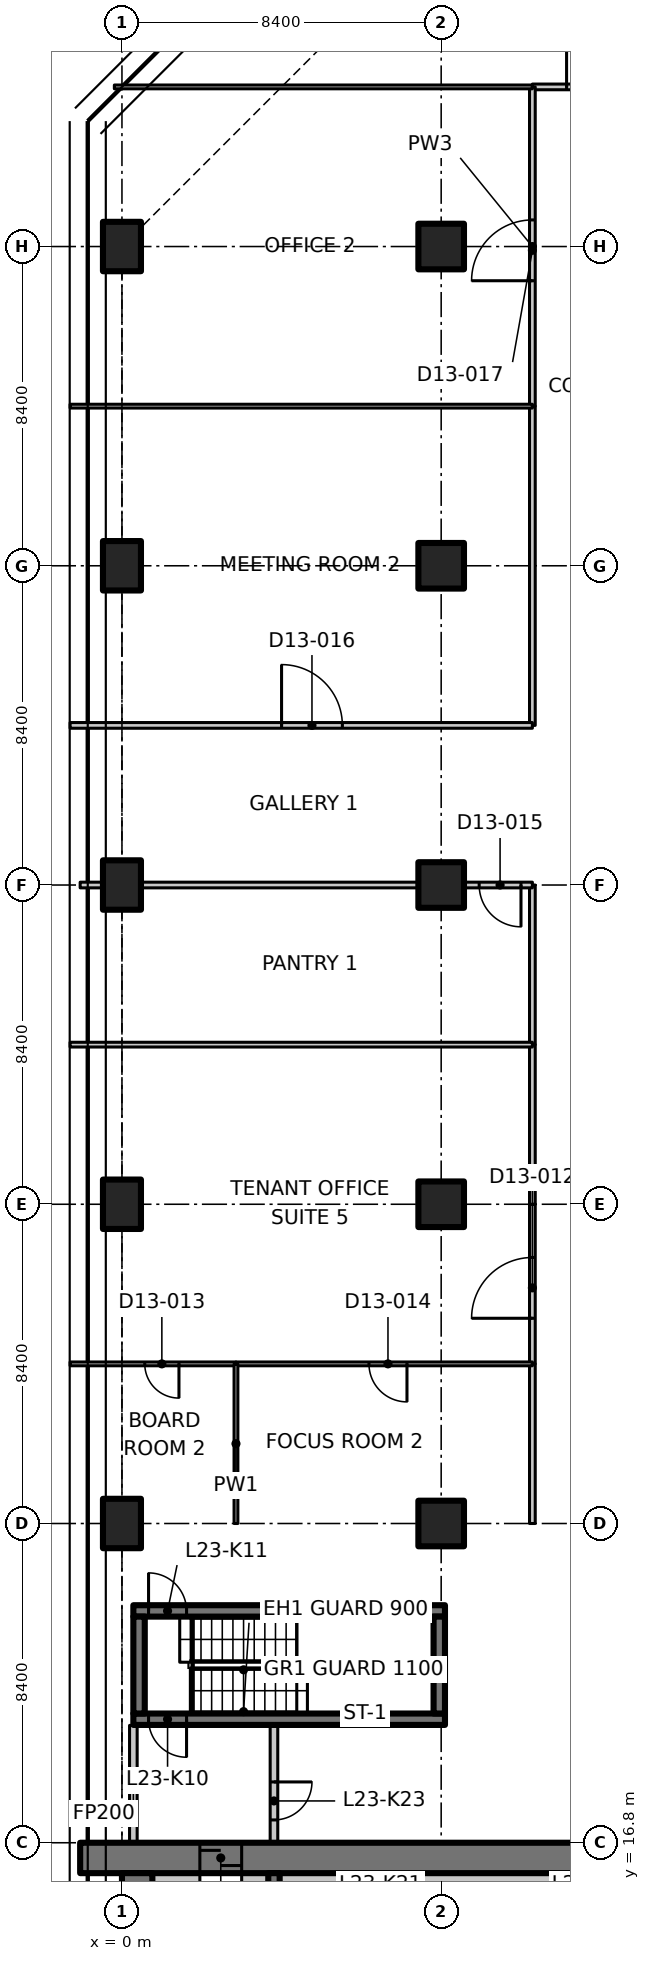
"""IFC4 building model, lengths in metres.
Left out: names, types, materials, properties, quantities, classifications, styles, units other than length and angle.
Written with IfcOpenShell. Run it as: python <this file> out.ifc"""

import sys

from ifc_helpers import new_model, si_unit, direction, frame, frame_2d, origin, origin_2d, place, context, subcontext, project, spatial, polyline, rectangle, outline, extrude, element, fill, save


model = new_model("IFC4")
c1 = context("Model", 3, precision=1e-05, world=origin(), true_north=direction((0.0, 1.0)))
c2 = subcontext(c1, "Body", "Model", "MODEL_VIEW")
j1 = project(units=[si_unit("LENGTHUNIT", "METRE"), si_unit("PLANEANGLEUNIT", "RADIAN")], contexts=[c1])
p1 = place(None, origin())
s1 = spatial("IfcSite", under=j1, at=p1, CompositionType="ELEMENT")
p2 = place(p1, origin())
s2 = spatial("IfcBuilding", under=s1, at=p2, CompositionType="ELEMENT")
p3 = place(p2, frame((0.0, 0.0, 98.9)))
s3 = spatial("IfcBuildingStorey", under=s2, at=p3, CompositionType="ELEMENT", Elevation=98.9)
for number, where, z_axis, x_axis in (
    (1, (0.0, 25.2, 0.0), (0.0, 0.0, 1.0), (1.0, 0.0, 0.0)),
    (2, (0.0, 33.6, 0.0), (0.0, 0.0, 1.0), (1.0, 0.0, 0.0)),
    (3, (0.0, 42.0, 0.0), (0.0, 0.0, 1.0), (1.0, 0.0, 0.0)),
    (4, (0.0, 50.4, 0.0), (0.0, 0.0, 1.0), (1.0, 0.0, 0.0)),
    (5, (0.0, 58.8, 0.0), (0.0, 0.0, 1.0), (1.0, 0.0, 0.0)),
):
    element("IfcColumn", number, at=place(p3, frame(where, z_axis=z_axis, x_axis=x_axis)), inside=s3, PredefinedType="COLUMN", context=c2, shape_type="SweptSolid", body=[
        extrude(rectangle(XDim=1.0, YDim=1.3, at=origin_2d()), origin(), (0.0, 0.0, 1.0), 3.35),
    ])
for number, where, z_axis, x_axis in (
    (6, (8.4, 25.2, 0.0), (0.0, 0.0, 1.0), (1.0, 0.0, 0.0)),
    (7, (8.4, 33.6, 0.0), (0.0, 0.0, 1.0), (1.0, 0.0, 0.0)),
    (8, (8.4, 42.0, 0.0), (0.0, 0.0, 1.0), (1.0, 0.0, 0.0)),
    (9, (8.4, 50.4, 0.0), (0.0, 0.0, 1.0), (1.0, 0.0, 0.0)),
    (10, (8.4, 58.8, 0.0), (0.0, 0.0, 1.0), (1.0, 0.0, 0.0)),
):
    element("IfcColumn", number, at=place(p3, frame(where, z_axis=z_axis, x_axis=x_axis)), inside=s3, PredefinedType="COLUMN", context=c2, shape_type="SweptSolid", body=[
        extrude(rectangle(XDim=1.2, YDim=1.2, at=origin_2d()), origin(), (0.0, 0.0, 1.0), 3.35),
    ])
p4 = place(p3, frame((-1.1, 16.4, 0.0), z_axis=(0.0, 0.0, 1.0), x_axis=(1.0, 0.0, 0.0)))
e11 = element("IfcWall", 11, at=p4, inside=s3, PredefinedType="SHEAR", context=c2, shape_type="SweptSolid", body=[
    extrude(rectangle(XDim=22.1, YDim=0.8, at=frame_2d((11.05, 0.0))), origin(), (0.0, 0.0, 1.0), 3.35),
])
p5 = place(p4, frame((3.15, 0.0, 0.0)))
e12 = element("IfcOpeningElement", 12, at=p5, cuts=e11, PredefinedType="OPENING", context=c2, shape_type="SweptSolid", body=[
    extrude(rectangle(XDim=1.1, YDim=2.3, at=frame_2d((0.55, 1.15))), frame((0.0, 0.41, 0.0), z_axis=(0.0, -1.0, 0.0), x_axis=(1.0, 0.0, 0.0)), (0.0, 0.0, 1.0), 0.82),
])
p6 = place(p3, frame((0.4, 7.136, 0.0), z_axis=(0.0, 0.0, 1.0), x_axis=(0.0, 1.0, 0.0)))
e13 = element("IfcWall", 13, at=p6, inside=s3, PredefinedType="SHEAR", context=c2, shape_type="SweptSolid", body=[
    extrude(rectangle(XDim=8.864, YDim=0.8, at=frame_2d((4.432, 0.0))), origin(), (0.0, 0.0, 1.0), 3.35),
])
p7 = place(p3, frame((0.8, 15.8, 0.0), z_axis=(0.0, 0.0, 1.0), x_axis=(1.0, 0.0, 0.0)))
e14 = element("IfcWall", 14, at=p7, inside=s3, PredefinedType="PARTITIONING", context=c2, shape_type="SweptSolid", body=[
    extrude(rectangle(XDim=1.25, YDim=0.4, at=frame_2d((0.625, 0.0))), origin(), (0.0, 0.0, 1.0), 3.35),
])
p8 = place(p3, frame((4.0, 12.95, 0.0), z_axis=(0.0, 0.0, 1.0), x_axis=(0.0, 1.0, 0.0)))
e15 = element("IfcWall", 15, at=p8, inside=s3, PredefinedType="SHEAR", context=c2, shape_type="SweptSolid", body=[
    extrude(rectangle(XDim=3.05, YDim=0.3, at=frame_2d((1.525, 0.0))), origin(), (0.0, 0.0, 1.0), 3.35),
])
p9 = place(p3, frame((8.5, 20.05, 0.0), z_axis=(0.0, 0.0, 1.0), x_axis=(-1.0, 0.0, 0.0)))
e16 = element("IfcWall", 16, at=p9, inside=s3, PredefinedType="SHEAR", context=c2, shape_type="SweptSolid", body=[
    extrude(rectangle(XDim=8.2, YDim=0.3, at=frame_2d((4.1, 0.0))), origin(), (0.0, 0.0, 1.0), 3.35),
])
p10 = place(p9, frame((6.8, 0.0, 0.0)))
e17 = element("IfcOpeningElement", 17, at=p10, cuts=e16, PredefinedType="OPENING", context=c2, shape_type="SweptSolid", body=[
    extrude(rectangle(XDim=1.0, YDim=2.1, at=frame_2d((0.5, 1.05))), frame((0.0, 0.16, 0.0), z_axis=(0.0, -1.0, 0.0), x_axis=(1.0, 0.0, 0.0)), (0.0, 0.0, 1.0), 0.32),
])
p11 = place(p3, frame((0.3, 22.9, 0.0), z_axis=(0.0, 0.0, 1.0), x_axis=(1.0, 0.0, 0.0)))
e18 = element("IfcWall", 18, at=p11, inside=s3, PredefinedType="SHEAR", context=c2, shape_type="SweptSolid", body=[
    extrude(rectangle(XDim=8.2, YDim=0.3, at=frame_2d((4.1, 0.0))), origin(), (0.0, 0.0, 1.0), 3.35),
])
p12 = place(p11, frame((0.4, 0.0, 0.0)))
e19 = element("IfcOpeningElement", 19, at=p12, cuts=e18, PredefinedType="OPENING", context=c2, shape_type="SweptSolid", body=[
    extrude(rectangle(XDim=1.0, YDim=2.1, at=frame_2d((0.5, 1.05))), frame((0.0, 0.16, 0.0), z_axis=(0.0, -1.0, 0.0), x_axis=(1.0, 0.0, 0.0)), (0.0, 0.0, 1.0), 0.32),
])
for number, where, z_axis, x_axis in (
    (20, (0.45, 20.2, 0.0), (0.0, 0.0, 1.0), (0.0, 1.0, 0.0)),
    (21, (8.35, 20.2, 0.0), (0.0, 0.0, 1.0), (0.0, 1.0, 0.0)),
):
    element("IfcWall", number, at=place(p3, frame(where, z_axis=z_axis, x_axis=x_axis)), inside=s3, PredefinedType="SHEAR", context=c2, shape_type="SweptSolid", body=[
        extrude(rectangle(XDim=2.55, YDim=0.3, at=frame_2d((1.275, 0.0))), origin(), (0.0, 0.0, 1.0), 3.35),
    ])
p13 = place(p3, frame((0.3, 16.812, 0.0), z_axis=(0.0, 0.0, 1.0), x_axis=(0.0, 1.0, 0.0)))
e22 = element("IfcWall", 22, at=p13, inside=s3, PredefinedType="PARTITIONING", context=c2, shape_type="SweptSolid", body=[
    extrude(rectangle(XDim=3.076, YDim=0.2, at=frame_2d((1.538, 0.0))), origin(), (0.0, 0.0, 1.0), 2.98),
])
p14 = place(p3, frame((4.0, 19.888, 0.0), z_axis=(0.0, 0.0, 1.0), x_axis=(0.0, -1.0, 0.0)))
e23 = element("IfcWall", 23, at=p14, inside=s3, PredefinedType="PARTITIONING", context=c2, shape_type="SweptSolid", body=[
    extrude(rectangle(XDim=3.076, YDim=0.2, at=frame_2d((1.538, 0.0))), origin(), (0.0, 0.0, 1.0), 3.35),
])
p15 = place(p14, frame((1.488, 0.0, 0.0)))
e24 = element("IfcOpeningElement", 24, at=p15, cuts=e23, PredefinedType="OPENING", context=c2, shape_type="SweptSolid", body=[
    extrude(rectangle(XDim=1.0, YDim=2.1, at=frame_2d((0.5, 1.05))), frame((0.0, 0.11, 0.0), z_axis=(0.0, -1.0, 0.0), x_axis=(1.0, 0.0, 0.0)), (0.0, 0.0, 1.0), 0.22),
])
p16 = place(p3, frame((3.15, 15.8, 0.0), z_axis=(0.0, 0.0, 1.0), x_axis=(1.0, 0.0, 0.0)))
e25 = element("IfcWall", 25, at=p16, inside=s3, PredefinedType="PARTITIONING", context=c2, shape_type="SweptSolid", body=[
    extrude(rectangle(XDim=0.7, YDim=0.4, at=frame_2d((0.35, 0.0))), origin(), (0.0, 0.0, 1.0), 3.35),
])
p17 = place(p3, frame((4.15, 15.8, 0.0), z_axis=(0.0, 0.0, 1.0), x_axis=(1.0, 0.0, 0.0)))
e26 = element("IfcWall", 26, at=p17, inside=s3, PredefinedType="PARTITIONING", context=c2, shape_type="SweptSolid", body=[
    extrude(rectangle(XDim=10.9, YDim=0.4, at=frame_2d((5.45, 0.0))), origin(), (0.0, 0.0, 1.0), 3.35),
])
p18 = place(p3, frame((10.8, 29.4, 0.0), z_axis=(0.0, 0.0, 1.0), x_axis=(0.0, 1.0, 0.0)))
e27 = element("IfcWall", 27, at=p18, inside=s3, PredefinedType="PARTITIONING", context=c2, shape_type="SweptSolid", body=[
    extrude(rectangle(XDim=4.2, YDim=0.15, at=frame_2d((2.1, 0.0))), origin(), (0.0, 0.0, 1.0), 3.33),
])
p19 = place(p18, frame((1.2, 0.0, 0.0)))
e28 = element("IfcOpeningElement", 28, at=p19, cuts=e27, PredefinedType="OPENING", context=c2, shape_type="SweptSolid", body=[
    extrude(rectangle(XDim=1.6, YDim=2.1, at=frame_2d((0.8, 1.05))), frame((0.0, 0.085, 0.0), z_axis=(0.0, -1.0, 0.0), x_axis=(1.0, 0.0, 0.0)), (0.0, 0.0, 1.0), 0.17),
])
p20 = place(p3, frame((10.8, 25.2, 0.0), z_axis=(0.0, 0.0, 1.0), x_axis=(0.0, 1.0, 0.0)))
e29 = element("IfcWall", 29, at=p20, inside=s3, PredefinedType="PARTITIONING", context=c2, shape_type="SweptSolid", body=[
    extrude(rectangle(XDim=4.2, YDim=0.15, at=frame_2d((2.1, 0.0))), origin(), (0.0, 0.0, 1.0), 3.33),
])
p21 = place(p3, frame((10.8, 63.0, 0.0), z_axis=(0.0, 0.0, 1.0), x_axis=(1.0, 0.0, 0.0)))
e30 = element("IfcWall", 30, at=p21, inside=s3, PredefinedType="PARTITIONING", context=c2, shape_type="SweptSolid", body=[
    extrude(rectangle(XDim=3.6, YDim=0.15, at=frame_2d((1.8, 0.0))), origin(), (0.0, 0.0, 1.0), 3.33),
])
p22 = place(p21, frame((0.9, 0.0, 0.0)))
e31 = element("IfcOpeningElement", 31, at=p22, cuts=e30, PredefinedType="OPENING", context=c2, shape_type="SweptSolid", body=[
    extrude(rectangle(XDim=2.0, YDim=2.4, at=frame_2d((1.0, 1.2))), frame((0.0, 0.085, 0.0), z_axis=(0.0, -1.0, 0.0), x_axis=(1.0, 0.0, 0.0)), (0.0, 0.0, 1.0), 0.17),
])
for number, where, z_axis, x_axis in (
    (32, (10.8, 33.6, 0.0), (0.0, 0.0, 1.0), (0.0, 1.0, 0.0)),
    (33, (10.8, 37.8, 0.0), (0.0, 0.0, 1.0), (0.0, 1.0, 0.0)),
):
    element("IfcWall", number, at=place(p3, frame(where, z_axis=z_axis, x_axis=x_axis)), inside=s3, PredefinedType="PARTITIONING", context=c2, shape_type="SweptSolid", body=[
        extrude(rectangle(XDim=4.2, YDim=0.15, at=frame_2d((2.1, 0.0))), origin(), (0.0, 0.0, 1.0), 3.33),
    ])
p23 = place(p3, frame((10.8, 46.2, 0.0), z_axis=(0.0, 0.0, 1.0), x_axis=(0.0, 1.0, 0.0)))
e34 = element("IfcWall", 34, at=p23, inside=s3, PredefinedType="PARTITIONING", context=c2, shape_type="SweptSolid", body=[
    extrude(rectangle(XDim=8.4, YDim=0.15, at=frame_2d((4.2, 0.0))), origin(), (0.0, 0.0, 1.0), 3.33),
])
p24 = place(p3, frame((10.8, 54.6, 0.0), z_axis=(0.0, 0.0, 1.0), x_axis=(0.0, 1.0, 0.0)))
e35 = element("IfcWall", 35, at=p24, inside=s3, PredefinedType="PARTITIONING", context=c2, shape_type="SweptSolid", body=[
    extrude(rectangle(XDim=8.4, YDim=0.15, at=frame_2d((4.2, 0.0))), origin(), (0.0, 0.0, 1.0), 3.33),
])
p25 = place(p24, frame((3.3, 0.0, 0.0)))
e36 = element("IfcOpeningElement", 36, at=p25, cuts=e35, PredefinedType="OPENING", context=c2, shape_type="SweptSolid", body=[
    extrude(rectangle(XDim=1.6, YDim=2.1, at=frame_2d((0.8, 1.05))), frame((0.0, 0.085, 0.0), z_axis=(0.0, -1.0, 0.0), x_axis=(1.0, 0.0, 0.0)), (0.0, 0.0, 1.0), 0.17),
])
p26 = place(p3, frame((10.8, 63.0, 0.0), z_axis=(0.0, 0.0, 1.0), x_axis=(-1.0, 0.0, 0.0)))
e37 = element("IfcWall", 37, at=p26, inside=s3, PredefinedType="PARTITIONING", context=c2, shape_type="SweptSolid", body=[
    extrude(outline(polyline([(0.0, 0.0), (11.0, 0.0), (11.0, 3.33), (7.266, 3.33), (7.264, 2.98), (5.936, 2.98), (5.934, 3.33), (0.0, 3.33), (0.0, 0.0)])), frame((0.0, 0.05, 0.0), z_axis=(0.0, -1.0, 0.0), x_axis=(1.0, 0.0, 0.0)), (0.0, 0.0, 1.0), 0.1),
])
p27 = place(p3, frame((10.8, 42.0, 0.0), z_axis=(0.0, 0.0, 1.0), x_axis=(-1.0, 0.0, 0.0)))
e38 = element("IfcWall", 38, at=p27, inside=s3, PredefinedType="PARTITIONING", context=c2, shape_type="SweptSolid", body=[
    extrude(rectangle(XDim=1.78, YDim=0.15, at=frame_2d((0.89, 0.0))), origin(), (0.0, 0.0, 1.0), 3.33),
])
p28 = place(p27, frame((0.3, 0.0, 0.0)))
e39 = element("IfcOpeningElement", 39, at=p28, cuts=e38, PredefinedType="OPENING", context=c2, shape_type="SweptSolid", body=[
    extrude(rectangle(XDim=1.1, YDim=2.1, at=frame_2d((0.55, 1.05))), frame((0.0, 0.085, 0.0), z_axis=(0.0, -1.0, 0.0), x_axis=(1.0, 0.0, 0.0)), (0.0, 0.0, 1.0), 0.17),
])
p29 = place(p3, frame((7.78, 42.0, 0.0), z_axis=(0.0, 0.0, 1.0), x_axis=(-1.0, 0.0, 0.0)))
e40 = element("IfcWall", 40, at=p29, inside=s3, PredefinedType="PARTITIONING", context=c2, shape_type="SweptSolid", body=[
    extrude(rectangle(XDim=7.26, YDim=0.15, at=frame_2d((3.63, 0.0))), origin(), (0.0, 0.0, 1.0), 3.33),
])
p30 = place(p3, frame((-0.52, 42.0, 0.0), z_axis=(0.0, 0.0, 1.0), x_axis=(-1.0, 0.0, 0.0)))
e41 = element("IfcWall", 41, at=p30, inside=s3, PredefinedType="PARTITIONING", context=c2, shape_type="SweptSolid", body=[
    extrude(rectangle(XDim=0.58, YDim=0.15, at=frame_2d((0.29, 0.0))), origin(), (0.0, 0.0, 1.0), 3.33),
])
p31 = place(p3, frame((-1.365, 46.2, 0.0), z_axis=(0.0, 0.0, 1.0), x_axis=(1.0, 0.0, 0.0)))
e42 = element("IfcWall", 42, at=p31, inside=s3, PredefinedType="PARTITIONING", context=c2, shape_type="SweptSolid", body=[
    extrude(outline(polyline([(0.0, 0.0), (12.165, 0.0), (12.165, 3.33), (1.815, 3.33), (1.813, 2.98), (0.917, 2.98), (0.915, 3.33), (0.265, 3.33), (0.0, 3.33), (0.0, 0.0)])), frame((0.0, 0.075, 0.0), z_axis=(0.0, -1.0, 0.0), x_axis=(1.0, 0.0, 0.0)), (0.0, 0.0, 1.0), 0.15),
])
p32 = place(p31, frame((5.565, 0.0, 0.0)))
e43 = element("IfcOpeningElement", 43, at=p32, cuts=e42, PredefinedType="OPENING", context=c2, shape_type="SweptSolid", body=[
    extrude(rectangle(XDim=1.6, YDim=2.1, at=frame_2d((0.8, 1.05))), frame((0.0, 0.085, 0.0), z_axis=(0.0, -1.0, 0.0), x_axis=(1.0, 0.0, 0.0)), (0.0, 0.0, 1.0), 0.17),
])
p33 = place(p3, frame((3.0, 29.4, 0.0), z_axis=(0.0, 0.0, 1.0), x_axis=(-1.0, 0.0, 0.0)))
e44 = element("IfcWall", 44, at=p33, inside=s3, PredefinedType="PARTITIONING", context=c2, shape_type="SweptSolid", body=[
    extrude(rectangle(XDim=4.365, YDim=0.1, at=frame_2d((2.183, 0.0))), origin(), (0.0, 0.0, 1.0), 2.98),
])
p34 = place(p33, frame((1.5, 0.0, 0.0)))
e45 = element("IfcOpeningElement", 45, at=p34, cuts=e44, PredefinedType="OPENING", context=c2, shape_type="SweptSolid", body=[
    extrude(rectangle(XDim=0.9, YDim=2.1, at=frame_2d((0.45, 1.05))), frame((0.0, 0.06, 0.0), z_axis=(0.0, -1.0, 0.0), x_axis=(1.0, 0.0, 0.0)), (0.0, 0.0, 1.0), 0.12),
])
p35 = place(p3, frame((10.8, 29.4, 0.0), z_axis=(0.0, 0.0, 1.0), x_axis=(-1.0, 0.0, 0.0)))
e46 = element("IfcWall", 46, at=p35, inside=s3, PredefinedType="PARTITIONING", context=c2, shape_type="SweptSolid", body=[
    extrude(rectangle(XDim=7.8, YDim=0.1, at=frame_2d((3.9, 0.0))), origin(), (0.0, 0.0, 1.0), 3.33),
])
p36 = place(p35, frame((3.3, 0.0, 0.0)))
e47 = element("IfcOpeningElement", 47, at=p36, cuts=e46, PredefinedType="OPENING", context=c2, shape_type="SweptSolid", body=[
    extrude(rectangle(XDim=1.0, YDim=2.1, at=frame_2d((0.5, 1.05))), frame((0.0, 0.06, 0.0), z_axis=(0.0, -1.0, 0.0), x_axis=(1.0, 0.0, 0.0)), (0.0, 0.0, 1.0), 0.12),
])
p37 = place(p3, frame((-1.365, 37.8, 0.0), z_axis=(0.0, 0.0, 1.0), x_axis=(1.0, 0.0, 0.0)))
e48 = element("IfcWall", 48, at=p37, inside=s3, PredefinedType="PARTITIONING", context=c2, shape_type="SweptSolid", body=[
    extrude(outline(polyline([(0.0, 0.0), (12.165, 0.0), (12.165, 3.33), (1.815, 3.33), (1.813, 2.98), (0.917, 2.98), (0.915, 3.33), (0.265, 3.33), (0.0, 3.33), (0.0, 0.0)])), frame((0.0, 0.062, 0.0), z_axis=(0.0, -1.0, 0.0), x_axis=(1.0, 0.0, 0.0)), (0.0, 0.0, 1.0), 0.125),
])
p38 = place(p3, frame((3.0, 29.4, 0.0), z_axis=(0.0, 0.0, 1.0), x_axis=(0.0, -1.0, 0.0)))
e49 = element("IfcWall", 49, at=p38, inside=s3, PredefinedType="PARTITIONING", context=c2, shape_type="SweptSolid", body=[
    extrude(rectangle(XDim=4.2, YDim=0.1, at=frame_2d((2.1, 0.0))), origin(), (0.0, 0.0, 1.0), 3.33),
])
p39 = place(p3, frame((-1.365, 54.6, 0.0), z_axis=(0.0, 0.0, 1.0), x_axis=(1.0, 0.0, 0.0)))
e50 = element("IfcWall", 50, at=p39, inside=s3, PredefinedType="PARTITIONING", context=c2, shape_type="SweptSolid", body=[
    extrude(outline(polyline([(0.0, 0.0), (12.165, 0.0), (12.165, 3.33), (1.815, 3.33), (1.813, 2.98), (0.917, 2.98), (0.915, 3.33), (0.265, 3.33), (0.0, 3.33), (0.0, 0.0)])), frame((0.0, 0.05, 0.0), z_axis=(0.0, -1.0, 0.0), x_axis=(1.0, 0.0, 0.0)), (0.0, 0.0, 1.0), 0.1),
])
p40 = place(p5, origin())
e51 = element("IfcDoor", 51, at=p40, inside=s3, OperationType="SLIDING_TO_LEFT", PredefinedType="DOOR", context=c2, shape_type="SweptSolid", body=[
    extrude(rectangle(XDim=1.1, YDim=2.3, at=frame_2d((0.55, 1.15))), frame((0.0, 0.025, 0.0), z_axis=(0.0, -1.0, 0.0), x_axis=(1.0, 0.0, 0.0)), (0.0, 0.0, 1.0), 0.05),
])
fill(e12, e51)
p41 = place(p10, origin())
e52 = element("IfcDoor", 52, at=p41, inside=s3, OperationType="SINGLE_SWING_RIGHT", PredefinedType="DOOR", context=c2, shape_type="SweptSolid", body=[
    extrude(rectangle(XDim=1.0, YDim=2.1, at=frame_2d((0.5, 1.05))), frame((0.0, 0.025, 0.0), z_axis=(0.0, -1.0, 0.0), x_axis=(1.0, 0.0, 0.0)), (0.0, 0.0, 1.0), 0.05),
])
fill(e17, e52)
p42 = place(p12, origin())
e53 = element("IfcDoor", 53, at=p42, inside=s3, OperationType="SINGLE_SWING_LEFT", PredefinedType="DOOR", context=c2, shape_type="SweptSolid", body=[
    extrude(rectangle(XDim=1.0, YDim=2.1, at=frame_2d((0.5, 1.05))), frame((0.0, 0.025, 0.0), z_axis=(0.0, -1.0, 0.0), x_axis=(1.0, 0.0, 0.0)), (0.0, 0.0, 1.0), 0.05),
])
fill(e19, e53)
p43 = place(p15, origin())
e54 = element("IfcDoor", 54, at=p43, inside=s3, OperationType="SINGLE_SWING_LEFT", PredefinedType="DOOR", context=c2, shape_type="SweptSolid", body=[
    extrude(rectangle(XDim=1.0, YDim=2.1, at=frame_2d((0.5, 1.05))), frame((0.0, 0.025, 0.0), z_axis=(0.0, -1.0, 0.0), x_axis=(1.0, 0.0, 0.0)), (0.0, 0.0, 1.0), 0.05),
])
fill(e24, e54)
p44 = place(p22, origin())
e55 = element("IfcDoor", 55, at=p44, inside=s3, OperationType="DOUBLE_DOOR_SINGLE_SWING", PredefinedType="DOOR", context=c2, shape_type="SweptSolid", body=[
    extrude(rectangle(XDim=2.0, YDim=2.4, at=frame_2d((1.0, 1.2))), frame((0.0, 0.025, 0.0), z_axis=(0.0, -1.0, 0.0), x_axis=(1.0, 0.0, 0.0)), (0.0, 0.0, 1.0), 0.05),
])
fill(e31, e55)
p45 = place(p19, origin())
e56 = element("IfcDoor", 56, at=p45, inside=s3, OperationType="DOUBLE_DOOR_SINGLE_SWING", PredefinedType="DOOR", context=c2, shape_type="SweptSolid", body=[
    extrude(rectangle(XDim=1.6, YDim=2.1, at=frame_2d((0.8, 1.05))), frame((0.0, 0.025, 0.0), z_axis=(0.0, -1.0, 0.0), x_axis=(1.0, 0.0, 0.0)), (0.0, 0.0, 1.0), 0.05),
])
fill(e28, e56)
p46 = place(p34, origin())
e57 = element("IfcDoor", 57, at=p46, inside=s3, OperationType="SINGLE_SWING_LEFT", PredefinedType="DOOR", context=c2, shape_type="SweptSolid", body=[
    extrude(rectangle(XDim=0.9, YDim=2.1, at=frame_2d((0.45, 1.05))), frame((0.0, 0.025, 0.0), z_axis=(0.0, -1.0, 0.0), x_axis=(1.0, 0.0, 0.0)), (0.0, 0.0, 1.0), 0.05),
])
fill(e45, e57)
p47 = place(p36, origin())
e58 = element("IfcDoor", 58, at=p47, inside=s3, OperationType="SINGLE_SWING_LEFT", PredefinedType="DOOR", context=c2, shape_type="SweptSolid", body=[
    extrude(rectangle(XDim=1.0, YDim=2.1, at=frame_2d((0.5, 1.05))), frame((0.0, 0.025, 0.0), z_axis=(0.0, -1.0, 0.0), x_axis=(1.0, 0.0, 0.0)), (0.0, 0.0, 1.0), 0.05),
])
fill(e47, e58)
p48 = place(p28, origin())
e59 = element("IfcDoor", 59, at=p48, inside=s3, OperationType="SINGLE_SWING_LEFT", PredefinedType="DOOR", context=c2, shape_type="SweptSolid", body=[
    extrude(rectangle(XDim=1.1, YDim=2.1, at=frame_2d((0.55, 1.05))), frame((0.0, 0.025, 0.0), z_axis=(0.0, -1.0, 0.0), x_axis=(1.0, 0.0, 0.0)), (0.0, 0.0, 1.0), 0.05),
])
fill(e39, e59)
p49 = place(p32, origin())
e60 = element("IfcDoor", 60, at=p49, inside=s3, OperationType="DOUBLE_DOOR_SINGLE_SWING", PredefinedType="DOOR", context=c2, shape_type="SweptSolid", body=[
    extrude(rectangle(XDim=1.6, YDim=2.1, at=frame_2d((0.8, 1.05))), frame((0.0, 0.025, 0.0), z_axis=(0.0, -1.0, 0.0), x_axis=(1.0, 0.0, 0.0)), (0.0, 0.0, 1.0), 0.05),
])
fill(e43, e60)
p50 = place(p25, origin())
e61 = element("IfcDoor", 61, at=p50, inside=s3, OperationType="DOUBLE_DOOR_SINGLE_SWING", PredefinedType="DOOR", context=c2, shape_type="SweptSolid", body=[
    extrude(rectangle(XDim=1.6, YDim=2.1, at=frame_2d((0.8, 1.05))), frame((0.0, 0.025, 0.0), z_axis=(0.0, -1.0, 0.0), x_axis=(1.0, 0.0, 0.0)), (0.0, 0.0, 1.0), 0.05),
])
fill(e36, e61)
save(model, sys.argv[1])
